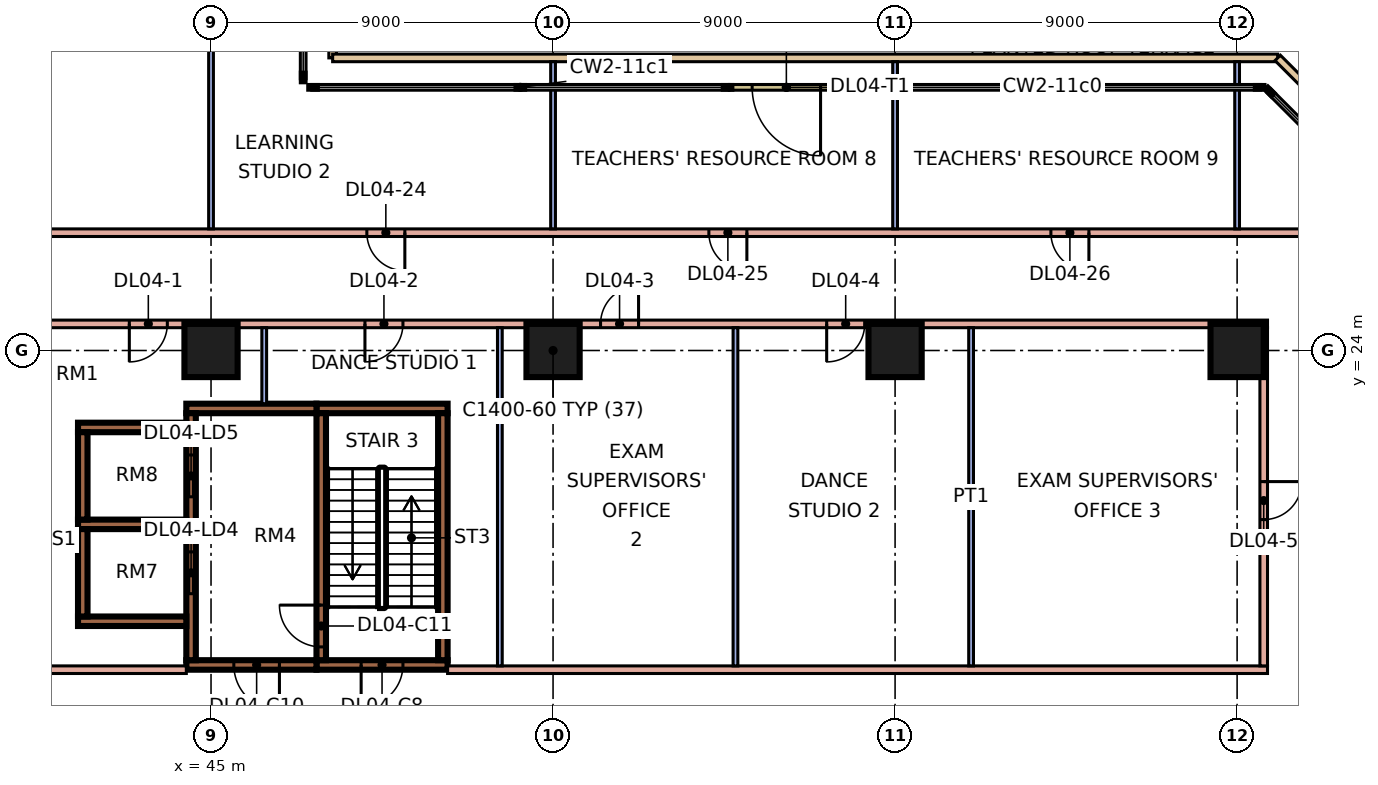
"""IFC4 building model, lengths in metres.
Left out: names, types, materials, properties, quantities, classifications, styles, units other than length and angle.
Written with IfcOpenShell. Run it as: python <this file> out.ifc"""

import sys

from ifc_helpers import new_model, si_unit, direction, frame, frame_2d, origin, origin_2d, place, context, subcontext, project, spatial, rectangle, extrude, element, fill, save


model = new_model("IFC4")
c1 = context("Model", 3, precision=1e-05, world=origin(), true_north=direction((0.0, 1.0)))
c2 = subcontext(c1, "Body", "Model", "MODEL_VIEW")
j1 = project(units=[si_unit("LENGTHUNIT", "METRE"), si_unit("PLANEANGLEUNIT", "RADIAN")], contexts=[c1])
p1 = place(None, origin())
s1 = spatial("IfcSite", under=j1, at=p1, CompositionType="ELEMENT")
p2 = place(p1, origin())
s2 = spatial("IfcBuilding", under=s1, at=p2, CompositionType="ELEMENT")
p3 = place(p2, frame((0.0, 0.0, 21.6)))
s3 = spatial("IfcBuildingStorey", under=s2, at=p3, CompositionType="ELEMENT", Elevation=21.6)
for number, where, z_axis, x_axis in (
    (1, (45.0, 24.0, 0.0), (0.0, 0.0, 1.0), (1.0, 0.0, 0.0)),
    (2, (54.0, 24.0, 0.0), (0.0, 0.0, 1.0), (1.0, 0.0, 0.0)),
    (3, (63.0, 24.0, 0.0), (0.0, 0.0, 1.0), (1.0, 0.0, 0.0)),
    (4, (72.0, 24.0, 0.0), (0.0, 0.0, 1.0), (1.0, 0.0, 0.0)),
):
    element("IfcColumn", number, at=place(p3, frame(where, z_axis=z_axis, x_axis=x_axis)), inside=s3, PredefinedType="COLUMN", context=c2, shape_type="SweptSolid", body=[
        extrude(rectangle(XDim=1.4, YDim=1.4, at=origin_2d()), origin(), (0.0, 0.0, 1.0), 4.8),
    ])
p4 = place(p3, frame((47.775, 15.725, 0.0), z_axis=(0.0, 0.0, 1.0), x_axis=(1.0, 0.0, 0.0)))
e5 = element("IfcWall", 5, at=p4, inside=s3, PredefinedType="SHEAR", context=c2, shape_type="SweptSolid", body=[
    extrude(rectangle(XDim=3.45, YDim=0.25, at=frame_2d((1.725, 0.0))), origin(), (0.0, 0.0, 1.0), 4.8),
])
p5 = place(p4, frame((1.175, 0.0, 0.0)))
e6 = element("IfcOpeningElement", 6, at=p5, cuts=e5, PredefinedType="OPENING", context=c2, shape_type="SweptSolid", body=[
    extrude(rectangle(XDim=1.1, YDim=2.2, at=frame_2d((0.55, 1.1))), frame((0.0, 0.135, 0.0), z_axis=(0.0, -1.0, 0.0), x_axis=(1.0, 0.0, 0.0)), (0.0, 0.0, 1.0), 0.27),
])
p6 = place(p3, frame((47.775, 22.475, 0.0), z_axis=(0.0, 0.0, 1.0), x_axis=(1.0, 0.0, 0.0)))
e7 = element("IfcWall", 7, at=p6, inside=s3, PredefinedType="SHEAR", context=c2, shape_type="SweptSolid", body=[
    extrude(rectangle(XDim=3.45, YDim=0.25, at=frame_2d((1.725, 0.0))), origin(), (0.0, 0.0, 1.0), 4.8),
])
p7 = place(p3, frame((47.9, 15.85, 0.0), z_axis=(0.0, 0.0, 1.0), x_axis=(0.0, 1.0, 0.0)))
e8 = element("IfcWall", 8, at=p7, inside=s3, PredefinedType="SHEAR", context=c2, shape_type="SweptSolid", body=[
    extrude(rectangle(XDim=6.5, YDim=0.25, at=frame_2d((3.25, 0.0))), origin(), (0.0, 0.0, 1.0), 4.8),
])
p8 = place(p7, frame((0.35, 0.0, 0.0)))
e9 = element("IfcOpeningElement", 9, at=p8, cuts=e8, PredefinedType="OPENING", context=c2, shape_type="SweptSolid", body=[
    extrude(rectangle(XDim=1.1, YDim=2.2, at=frame_2d((0.55, 1.1))), frame((0.0, 0.135, 0.0), z_axis=(0.0, -1.0, 0.0), x_axis=(1.0, 0.0, 0.0)), (0.0, 0.0, 1.0), 0.27),
])
p9 = place(p3, frame((51.1, 15.85, 0.0), z_axis=(0.0, 0.0, 1.0), x_axis=(0.0, 1.0, 0.0)))
e10 = element("IfcWall", 10, at=p9, inside=s3, PredefinedType="SHEAR", context=c2, shape_type="SweptSolid", body=[
    extrude(rectangle(XDim=6.5, YDim=0.25, at=frame_2d((3.25, 0.0))), origin(), (0.0, 0.0, 1.0), 4.8),
])
p10 = place(p3, frame((44.35, 15.725, 0.0), z_axis=(0.0, 0.0, 1.0), x_axis=(1.0, 0.0, 0.0)))
e11 = element("IfcWall", 11, at=p10, inside=s3, PredefinedType="SHEAR", context=c2, shape_type="SweptSolid", body=[
    extrude(rectangle(XDim=3.425, YDim=0.25, at=frame_2d((1.712, 0.0))), origin(), (0.0, 0.0, 1.0), 4.8),
])
p11 = place(p10, frame((1.25, 0.0, 0.0)))
e12 = element("IfcOpeningElement", 12, at=p11, cuts=e11, PredefinedType="OPENING", context=c2, shape_type="SweptSolid", body=[
    extrude(rectangle(XDim=1.2, YDim=2.2, at=frame_2d((0.6, 1.1))), frame((0.0, 0.135, 0.0), z_axis=(0.0, -1.0, 0.0), x_axis=(1.0, 0.0, 0.0)), (0.0, 0.0, 1.0), 0.27),
])
p12 = place(p3, frame((44.35, 22.475, 0.0), z_axis=(0.0, 0.0, 1.0), x_axis=(1.0, 0.0, 0.0)))
e13 = element("IfcWall", 13, at=p12, inside=s3, PredefinedType="SHEAR", context=c2, shape_type="SweptSolid", body=[
    extrude(rectangle(XDim=3.425, YDim=0.25, at=frame_2d((1.712, 0.0))), origin(), (0.0, 0.0, 1.0), 4.8),
])
p13 = place(p3, frame((44.475, 15.85, 0.0), z_axis=(0.0, 0.0, 1.0), x_axis=(0.0, 1.0, 0.0)))
e14 = element("IfcWall", 14, at=p13, inside=s3, PredefinedType="SHEAR", context=c2, shape_type="SweptSolid", body=[
    extrude(rectangle(XDim=6.5, YDim=0.25, at=frame_2d((3.25, 0.0))), origin(), (0.0, 0.0, 1.0), 4.8),
])
p14 = place(p13, frame((1.75, 0.0, 0.0)))
e15 = element("IfcOpeningElement", 15, at=p14, cuts=e14, PredefinedType="OPENING", context=c2, shape_type="SweptSolid", body=[
    extrude(rectangle(XDim=1.1, YDim=2.2, at=frame_2d((0.55, 1.1))), frame((0.0, 0.135, 0.0), z_axis=(0.0, -1.0, 0.0), x_axis=(1.0, 0.0, 0.0)), (0.0, 0.0, 1.0), 0.27),
])
p15 = place(p13, frame((4.3, 0.0, 0.0)))
e16 = element("IfcOpeningElement", 16, at=p15, cuts=e14, PredefinedType="OPENING", context=c2, shape_type="SweptSolid", body=[
    extrude(rectangle(XDim=1.1, YDim=2.2, at=frame_2d((0.55, 1.1))), frame((0.0, 0.135, 0.0), z_axis=(0.0, -1.0, 0.0), x_axis=(1.0, 0.0, 0.0)), (0.0, 0.0, 1.0), 0.27),
])
for number, where, z_axis, x_axis in (
    (17, (41.5, 16.875, 0.0), (0.0, 0.0, 1.0), (1.0, 0.0, 0.0)),
    (18, (41.5, 19.425, 0.0), (0.0, 0.0, 1.0), (1.0, 0.0, 0.0)),
    (19, (41.5, 21.975, 0.0), (0.0, 0.0, 1.0), (1.0, 0.0, 0.0)),
):
    element("IfcWall", number, at=place(p3, frame(where, z_axis=z_axis, x_axis=x_axis)), inside=s3, PredefinedType="SHEAR", context=c2, shape_type="SweptSolid", body=[
        extrude(rectangle(XDim=2.85, YDim=0.25, at=frame_2d((1.425, 0.0))), origin(), (0.0, 0.0, 1.0), 4.8),
    ])
for number, where, z_axis, x_axis in (
    (20, (41.625, 17.0, 0.0), (0.0, 0.0, 1.0), (0.0, 1.0, 0.0)),
    (21, (41.625, 19.55, 0.0), (0.0, 0.0, 1.0), (0.0, 1.0, 0.0)),
):
    element("IfcWall", number, at=place(p3, frame(where, z_axis=z_axis, x_axis=x_axis)), inside=s3, PredefinedType="SHEAR", context=c2, shape_type="SweptSolid", body=[
        extrude(rectangle(XDim=2.3, YDim=0.25, at=frame_2d((1.15, 0.0))), origin(), (0.0, 0.0, 1.0), 4.8),
    ])
p16 = place(p3, frame((61.639, 30.925, 0.0), z_axis=(0.0, 0.0, 1.0), x_axis=(-1.0, 0.0, 0.0)))
e22 = element("IfcWall", 22, at=p16, inside=s3, PredefinedType="SOLIDWALL", context=c2, shape_type="SweptSolid", body=[
    extrude(rectangle(XDim=3.0, YDim=0.15, at=frame_2d((1.5, 0.0))), origin(), (0.0, 0.0, 1.0), 4.4),
])
p17 = place(p16, frame((0.6, 0.0, 0.0)))
e23 = element("IfcOpeningElement", 23, at=p17, cuts=e22, PredefinedType="OPENING", context=c2, shape_type="SweptSolid", body=[
    extrude(rectangle(XDim=1.8, YDim=2.4, at=frame_2d((0.9, 1.2))), frame((0.0, 0.085, 0.0), z_axis=(0.0, -1.0, 0.0), x_axis=(1.0, 0.0, 0.0)), (0.0, 0.0, 1.0), 0.17),
])
p18 = place(p3, frame((48.2, 48.2, 0.0), z_axis=(0.0, 0.0, 1.0), x_axis=(0.0, -1.0, 0.0)))
e24 = element("IfcWall", 24, at=p18, inside=s3, PredefinedType="PARAPET", context=c2, shape_type="SweptSolid", body=[
    extrude(rectangle(XDim=16.5, YDim=0.2, at=frame_2d((8.25, 0.0))), origin(), (0.0, 0.0, 1.0), 0.5),
])
p19 = place(p3, frame((48.2, 31.7, 0.0), z_axis=(0.0, 0.0, 1.0), x_axis=(1.0, 0.0, 0.0)))
e25 = element("IfcWall", 25, at=p19, inside=s3, PredefinedType="PARAPET", context=c2, shape_type="SweptSolid", body=[
    extrude(rectangle(XDim=24.868, YDim=0.2, at=frame_2d((12.434, 0.0))), origin(), (0.0, 0.0, 1.0), 0.5),
])
p20 = place(p3, frame((73.068, 31.7, 0.0), z_axis=(0.0, 0.0, 1.0), x_axis=(0.707106781187, -0.707106781187, 0.0)))
e26 = element("IfcWall", 26, at=p20, inside=s3, PredefinedType="PARAPET", context=c2, shape_type="SweptSolid", body=[
    extrude(rectangle(XDim=9.379, YDim=0.2, at=frame_2d((4.689, 0.0))), origin(), (0.0, 0.0, 1.0), 0.5),
])
p21 = place(p3, frame((38.3, 27.1, 0.0), z_axis=(0.0, 0.0, 1.0), x_axis=(1.0, 0.0, 0.0)))
e27 = element("IfcWall", 27, at=p21, inside=s3, PredefinedType="PARTITIONING", context=c2, shape_type="SweptSolid", body=[
    extrude(rectangle(XDim=36.9, YDim=0.2, at=frame_2d((18.45, 0.0))), origin(), (0.0, 0.0, 1.0), 4.4),
])
p22 = place(p21, frame((10.8, 0.0, 0.0)))
e28 = element("IfcOpeningElement", 28, at=p22, cuts=e27, PredefinedType="OPENING", context=c2, shape_type="SweptSolid", body=[
    extrude(rectangle(XDim=1.0, YDim=2.1, at=frame_2d((0.5, 1.05))), frame((0.0, 0.11, 0.0), z_axis=(0.0, -1.0, 0.0), x_axis=(1.0, 0.0, 0.0)), (0.0, 0.0, 1.0), 0.22),
])
p23 = place(p21, frame((19.8, 0.0, 0.0)))
e29 = element("IfcOpeningElement", 29, at=p23, cuts=e27, PredefinedType="OPENING", context=c2, shape_type="SweptSolid", body=[
    extrude(rectangle(XDim=1.0, YDim=2.1, at=frame_2d((0.5, 1.05))), frame((0.0, 0.11, 0.0), z_axis=(0.0, -1.0, 0.0), x_axis=(1.0, 0.0, 0.0)), (0.0, 0.0, 1.0), 0.22),
])
p24 = place(p21, frame((28.8, 0.0, 0.0)))
e30 = element("IfcOpeningElement", 30, at=p24, cuts=e27, PredefinedType="OPENING", context=c2, shape_type="SweptSolid", body=[
    extrude(rectangle(XDim=1.0, YDim=2.1, at=frame_2d((0.5, 1.05))), frame((0.0, 0.11, 0.0), z_axis=(0.0, -1.0, 0.0), x_axis=(1.0, 0.0, 0.0)), (0.0, 0.0, 1.0), 0.22),
])
p25 = place(p3, frame((40.2, 15.6, 0.0), z_axis=(0.0, 0.0, 1.0), x_axis=(1.0, 0.0, 0.0)))
e31 = element("IfcWall", 31, at=p25, inside=s3, PredefinedType="PARTITIONING", context=c2, shape_type="SweptSolid", body=[
    extrude(rectangle(XDim=4.15, YDim=0.2, at=frame_2d((2.075, 0.0))), origin(), (0.0, 0.0, 1.0), 4.4),
])
p26 = place(p3, frame((40.2, 24.7, 0.0), z_axis=(0.0, 0.0, 1.0), x_axis=(1.0, 0.0, 0.0)))
e32 = element("IfcWall", 32, at=p26, inside=s3, PredefinedType="PARTITIONING", context=c2, shape_type="SweptSolid", body=[
    extrude(rectangle(XDim=32.6, YDim=0.2, at=frame_2d((16.3, 0.0))), origin(), (0.0, 0.0, 1.0), 4.4),
])
p27 = place(p26, frame((2.65, 0.0, 0.0)))
e33 = element("IfcOpeningElement", 33, at=p27, cuts=e32, PredefinedType="OPENING", context=c2, shape_type="SweptSolid", body=[
    extrude(rectangle(XDim=1.0, YDim=2.1, at=frame_2d((0.5, 1.05))), frame((0.0, 0.11, 0.0), z_axis=(0.0, -1.0, 0.0), x_axis=(1.0, 0.0, 0.0)), (0.0, 0.0, 1.0), 0.22),
])
p28 = place(p26, frame((8.85, 0.0, 0.0)))
e34 = element("IfcOpeningElement", 34, at=p28, cuts=e32, PredefinedType="OPENING", context=c2, shape_type="SweptSolid", body=[
    extrude(rectangle(XDim=1.0, YDim=2.1, at=frame_2d((0.5, 1.05))), frame((0.0, 0.11, 0.0), z_axis=(0.0, -1.0, 0.0), x_axis=(1.0, 0.0, 0.0)), (0.0, 0.0, 1.0), 0.22),
])
p29 = place(p26, frame((15.05, 0.0, 0.0)))
e35 = element("IfcOpeningElement", 35, at=p29, cuts=e32, PredefinedType="OPENING", context=c2, shape_type="SweptSolid", body=[
    extrude(rectangle(XDim=1.0, YDim=2.1, at=frame_2d((0.5, 1.05))), frame((0.0, 0.11, 0.0), z_axis=(0.0, -1.0, 0.0), x_axis=(1.0, 0.0, 0.0)), (0.0, 0.0, 1.0), 0.22),
])
p30 = place(p26, frame((21.0, 0.0, 0.0)))
e36 = element("IfcOpeningElement", 36, at=p30, cuts=e32, PredefinedType="OPENING", context=c2, shape_type="SweptSolid", body=[
    extrude(rectangle(XDim=1.0, YDim=2.1, at=frame_2d((0.5, 1.05))), frame((0.0, 0.11, 0.0), z_axis=(0.0, -1.0, 0.0), x_axis=(1.0, 0.0, 0.0)), (0.0, 0.0, 1.0), 0.22),
])
p31 = place(p3, frame((45.0, 27.2, 0.0), z_axis=(0.0, 0.0, 1.0), x_axis=(0.0, 1.0, 0.0)))
e37 = element("IfcWall", 37, at=p31, inside=s3, PredefinedType="PARTITIONING", context=c2, shape_type="SweptSolid", body=[
    extrude(rectangle(XDim=11.1, YDim=0.125, at=frame_2d((5.55, 0.0))), origin(), (0.0, 0.0, 1.0), 4.4),
])
p32 = place(p3, frame((46.4, 22.6, 0.0), z_axis=(0.0, 0.0, 1.0), x_axis=(0.0, 1.0, 0.0)))
e38 = element("IfcWall", 38, at=p32, inside=s3, PredefinedType="PARTITIONING", context=c2, shape_type="SweptSolid", body=[
    extrude(rectangle(XDim=2.0, YDim=0.125, at=frame_2d((1.0, 0.0))), origin(), (0.0, 0.0, 1.0), 4.4),
])
p33 = place(p3, frame((51.225, 15.6, 0.0), z_axis=(0.0, 0.0, 1.0), x_axis=(1.0, 0.0, 0.0)))
e39 = element("IfcWall", 39, at=p33, inside=s3, PredefinedType="PARTITIONING", context=c2, shape_type="SweptSolid", body=[
    extrude(rectangle(XDim=21.575, YDim=0.2, at=frame_2d((10.788, 0.0))), origin(), (0.0, 0.0, 1.0), 4.4),
])
p34 = place(p3, frame((52.6, 15.7, 0.0), z_axis=(0.0, 0.0, 1.0), x_axis=(0.0, 1.0, 0.0)))
e40 = element("IfcWall", 40, at=p34, inside=s3, PredefinedType="PARTITIONING", context=c2, shape_type="SweptSolid", body=[
    extrude(rectangle(XDim=8.9, YDim=0.125, at=frame_2d((4.45, 0.0))), origin(), (0.0, 0.0, 1.0), 4.4),
])
p35 = place(p3, frame((54.0, 27.2, 0.0), z_axis=(0.0, 0.0, 1.0), x_axis=(0.0, 1.0, 0.0)))
e41 = element("IfcWall", 41, at=p35, inside=s3, PredefinedType="PARTITIONING", context=c2, shape_type="SweptSolid", body=[
    extrude(rectangle(XDim=4.4, YDim=0.125, at=frame_2d((2.2, 0.0))), origin(), (0.0, 0.0, 1.0), 4.4),
])
p36 = place(p3, frame((58.8, 15.7, 0.0), z_axis=(0.0, 0.0, 1.0), x_axis=(0.0, 1.0, 0.0)))
e42 = element("IfcWall", 42, at=p36, inside=s3, PredefinedType="PARTITIONING", context=c2, shape_type="SweptSolid", body=[
    extrude(rectangle(XDim=8.9, YDim=0.125, at=frame_2d((4.45, 0.0))), origin(), (0.0, 0.0, 1.0), 4.4),
])
p37 = place(p3, frame((63.0, 27.2, 0.0), z_axis=(0.0, 0.0, 1.0), x_axis=(0.0, 1.0, 0.0)))
e43 = element("IfcWall", 43, at=p37, inside=s3, PredefinedType="PARTITIONING", context=c2, shape_type="SweptSolid", body=[
    extrude(rectangle(XDim=4.4, YDim=0.125, at=frame_2d((2.2, 0.0))), origin(), (0.0, 0.0, 1.0), 4.4),
])
p38 = place(p3, frame((65.0, 15.7, 0.0), z_axis=(0.0, 0.0, 1.0), x_axis=(0.0, 1.0, 0.0)))
e44 = element("IfcWall", 44, at=p38, inside=s3, PredefinedType="PARTITIONING", context=c2, shape_type="SweptSolid", body=[
    extrude(rectangle(XDim=8.9, YDim=0.125, at=frame_2d((4.45, 0.0))), origin(), (0.0, 0.0, 1.0), 4.4),
])
p39 = place(p3, frame((72.0, 27.2, 0.0), z_axis=(0.0, 0.0, 1.0), x_axis=(0.0, 1.0, 0.0)))
e45 = element("IfcWall", 45, at=p39, inside=s3, PredefinedType="PARTITIONING", context=c2, shape_type="SweptSolid", body=[
    extrude(rectangle(XDim=4.4, YDim=0.125, at=frame_2d((2.2, 0.0))), origin(), (0.0, 0.0, 1.0), 4.4),
])
p40 = place(p3, frame((72.7, 15.7, 0.0), z_axis=(0.0, 0.0, 1.0), x_axis=(0.0, 1.0, 0.0)))
e46 = element("IfcWall", 46, at=p40, inside=s3, PredefinedType="PARTITIONING", context=c2, shape_type="SweptSolid", body=[
    extrude(rectangle(XDim=8.9, YDim=0.2, at=frame_2d((4.45, 0.0))), origin(), (0.0, 0.0, 1.0), 4.4),
])
p41 = place(p40, frame((3.85, 0.0, 0.0)))
e47 = element("IfcOpeningElement", 47, at=p41, cuts=e46, PredefinedType="OPENING", context=c2, shape_type="SweptSolid", body=[
    extrude(rectangle(XDim=1.0, YDim=2.1, at=frame_2d((0.5, 1.05))), frame((0.0, 0.11, 0.0), z_axis=(0.0, -1.0, 0.0), x_axis=(1.0, 0.0, 0.0)), (0.0, 0.0, 1.0), 0.22),
])
p42 = place(p17, origin())
e48 = element("IfcDoor", 48, at=p42, inside=s3, OperationType="DOUBLE_DOOR_SINGLE_SWING", PredefinedType="DOOR", context=c2, shape_type="SweptSolid", body=[
    extrude(rectangle(XDim=1.8, YDim=2.4, at=frame_2d((0.9, 1.2))), frame((0.0, 0.025, 0.0), z_axis=(0.0, -1.0, 0.0), x_axis=(1.0, 0.0, 0.0)), (0.0, 0.0, 1.0), 0.05),
])
fill(e23, e48)
p43 = place(p5, frame((1.1, 0.0, 0.0), z_axis=(0.0, 0.0, 1.0), x_axis=(-1.0, 0.0, 0.0)))
e49 = element("IfcDoor", 49, at=p43, inside=s3, OperationType="SINGLE_SWING_LEFT", PredefinedType="DOOR", context=c2, shape_type="SweptSolid", body=[
    extrude(rectangle(XDim=1.1, YDim=2.2, at=frame_2d((0.55, 1.1))), frame((0.0, 0.025, 0.0), z_axis=(0.0, -1.0, 0.0), x_axis=(1.0, 0.0, 0.0)), (0.0, 0.0, 1.0), 0.05),
])
fill(e6, e49)
p44 = place(p11, origin())
e50 = element("IfcDoor", 50, at=p44, inside=s3, OperationType="SINGLE_SWING_RIGHT", PredefinedType="DOOR", context=c2, shape_type="SweptSolid", body=[
    extrude(rectangle(XDim=1.2, YDim=2.2, at=frame_2d((0.6, 1.1))), frame((0.0, 0.025, 0.0), z_axis=(0.0, -1.0, 0.0), x_axis=(1.0, 0.0, 0.0)), (0.0, 0.0, 1.0), 0.05),
])
fill(e12, e50)
p45 = place(p8, frame((1.1, 0.0, 0.0), z_axis=(0.0, 0.0, 1.0), x_axis=(-1.0, 0.0, 0.0)))
e51 = element("IfcDoor", 51, at=p45, inside=s3, OperationType="SINGLE_SWING_RIGHT", PredefinedType="DOOR", context=c2, shape_type="SweptSolid", body=[
    extrude(rectangle(XDim=1.1, YDim=2.2, at=frame_2d((0.55, 1.1))), frame((0.0, 0.025, 0.0), z_axis=(0.0, -1.0, 0.0), x_axis=(1.0, 0.0, 0.0)), (0.0, 0.0, 1.0), 0.05),
])
fill(e9, e51)
p46 = place(p14, origin())
e52 = element("IfcDoor", 52, at=p46, inside=s3, OperationType="DOUBLE_DOOR_SLIDING", PredefinedType="DOOR", context=c2, shape_type="SweptSolid", body=[
    extrude(rectangle(XDim=1.1, YDim=2.2, at=frame_2d((0.55, 1.1))), frame((0.0, 0.025, 0.0), z_axis=(0.0, -1.0, 0.0), x_axis=(1.0, 0.0, 0.0)), (0.0, 0.0, 1.0), 0.05),
])
fill(e15, e52)
p47 = place(p15, origin())
e53 = element("IfcDoor", 53, at=p47, inside=s3, OperationType="DOUBLE_DOOR_SLIDING", PredefinedType="DOOR", context=c2, shape_type="SweptSolid", body=[
    extrude(rectangle(XDim=1.1, YDim=2.2, at=frame_2d((0.55, 1.1))), frame((0.0, 0.025, 0.0), z_axis=(0.0, -1.0, 0.0), x_axis=(1.0, 0.0, 0.0)), (0.0, 0.0, 1.0), 0.05),
])
fill(e16, e53)
p48 = place(p27, frame((1.0, 0.0, 0.0), z_axis=(0.0, 0.0, 1.0), x_axis=(-1.0, 0.0, 0.0)))
e54 = element("IfcDoor", 54, at=p48, inside=s3, OperationType="SINGLE_SWING_LEFT", PredefinedType="DOOR", context=c2, shape_type="SweptSolid", body=[
    extrude(rectangle(XDim=1.0, YDim=2.1, at=frame_2d((0.5, 1.05))), frame((0.0, 0.025, 0.0), z_axis=(0.0, -1.0, 0.0), x_axis=(1.0, 0.0, 0.0)), (0.0, 0.0, 1.0), 0.05),
])
fill(e33, e54)
p49 = place(p28, frame((1.0, 0.0, 0.0), z_axis=(0.0, 0.0, 1.0), x_axis=(-1.0, 0.0, 0.0)))
e55 = element("IfcDoor", 55, at=p49, inside=s3, OperationType="SINGLE_SWING_LEFT", PredefinedType="DOOR", context=c2, shape_type="SweptSolid", body=[
    extrude(rectangle(XDim=1.0, YDim=2.1, at=frame_2d((0.5, 1.05))), frame((0.0, 0.025, 0.0), z_axis=(0.0, -1.0, 0.0), x_axis=(1.0, 0.0, 0.0)), (0.0, 0.0, 1.0), 0.05),
])
fill(e34, e55)
p50 = place(p29, frame((1.0, 0.0, 0.0), z_axis=(0.0, 0.0, 1.0), x_axis=(-1.0, 0.0, 0.0)))
e56 = element("IfcDoor", 56, at=p50, inside=s3, OperationType="SINGLE_SWING_RIGHT", PredefinedType="DOOR", context=c2, shape_type="SweptSolid", body=[
    extrude(rectangle(XDim=1.0, YDim=2.1, at=frame_2d((0.5, 1.05))), frame((0.0, 0.025, 0.0), z_axis=(0.0, -1.0, 0.0), x_axis=(1.0, 0.0, 0.0)), (0.0, 0.0, 1.0), 0.05),
])
fill(e35, e56)
p51 = place(p30, frame((1.0, 0.0, 0.0), z_axis=(0.0, 0.0, 1.0), x_axis=(-1.0, 0.0, 0.0)))
e57 = element("IfcDoor", 57, at=p51, inside=s3, OperationType="SINGLE_SWING_LEFT", PredefinedType="DOOR", context=c2, shape_type="SweptSolid", body=[
    extrude(rectangle(XDim=1.0, YDim=2.1, at=frame_2d((0.5, 1.05))), frame((0.0, 0.025, 0.0), z_axis=(0.0, -1.0, 0.0), x_axis=(1.0, 0.0, 0.0)), (0.0, 0.0, 1.0), 0.05),
])
fill(e36, e57)
p52 = place(p41, origin())
e58 = element("IfcDoor", 58, at=p52, inside=s3, OperationType="SINGLE_SWING_RIGHT", PredefinedType="DOOR", context=c2, shape_type="SweptSolid", body=[
    extrude(rectangle(XDim=1.0, YDim=2.1, at=frame_2d((0.5, 1.05))), frame((0.0, 0.025, 0.0), z_axis=(0.0, -1.0, 0.0), x_axis=(1.0, 0.0, 0.0)), (0.0, 0.0, 1.0), 0.05),
])
fill(e47, e58)
p53 = place(p22, origin())
e59 = element("IfcDoor", 59, at=p53, inside=s3, OperationType="SINGLE_SWING_RIGHT", PredefinedType="DOOR", context=c2, shape_type="SweptSolid", body=[
    extrude(rectangle(XDim=1.0, YDim=2.1, at=frame_2d((0.5, 1.05))), frame((0.0, 0.025, 0.0), z_axis=(0.0, -1.0, 0.0), x_axis=(1.0, 0.0, 0.0)), (0.0, 0.0, 1.0), 0.05),
])
fill(e28, e59)
p54 = place(p23, origin())
e60 = element("IfcDoor", 60, at=p54, inside=s3, OperationType="SINGLE_SWING_RIGHT", PredefinedType="DOOR", context=c2, shape_type="SweptSolid", body=[
    extrude(rectangle(XDim=1.0, YDim=2.1, at=frame_2d((0.5, 1.05))), frame((0.0, 0.025, 0.0), z_axis=(0.0, -1.0, 0.0), x_axis=(1.0, 0.0, 0.0)), (0.0, 0.0, 1.0), 0.05),
])
fill(e29, e60)
p55 = place(p24, origin())
e61 = element("IfcDoor", 61, at=p55, inside=s3, OperationType="SINGLE_SWING_RIGHT", PredefinedType="DOOR", context=c2, shape_type="SweptSolid", body=[
    extrude(rectangle(XDim=1.0, YDim=2.1, at=frame_2d((0.5, 1.05))), frame((0.0, 0.025, 0.0), z_axis=(0.0, -1.0, 0.0), x_axis=(1.0, 0.0, 0.0)), (0.0, 0.0, 1.0), 0.05),
])
fill(e30, e61)
save(model, sys.argv[1])
